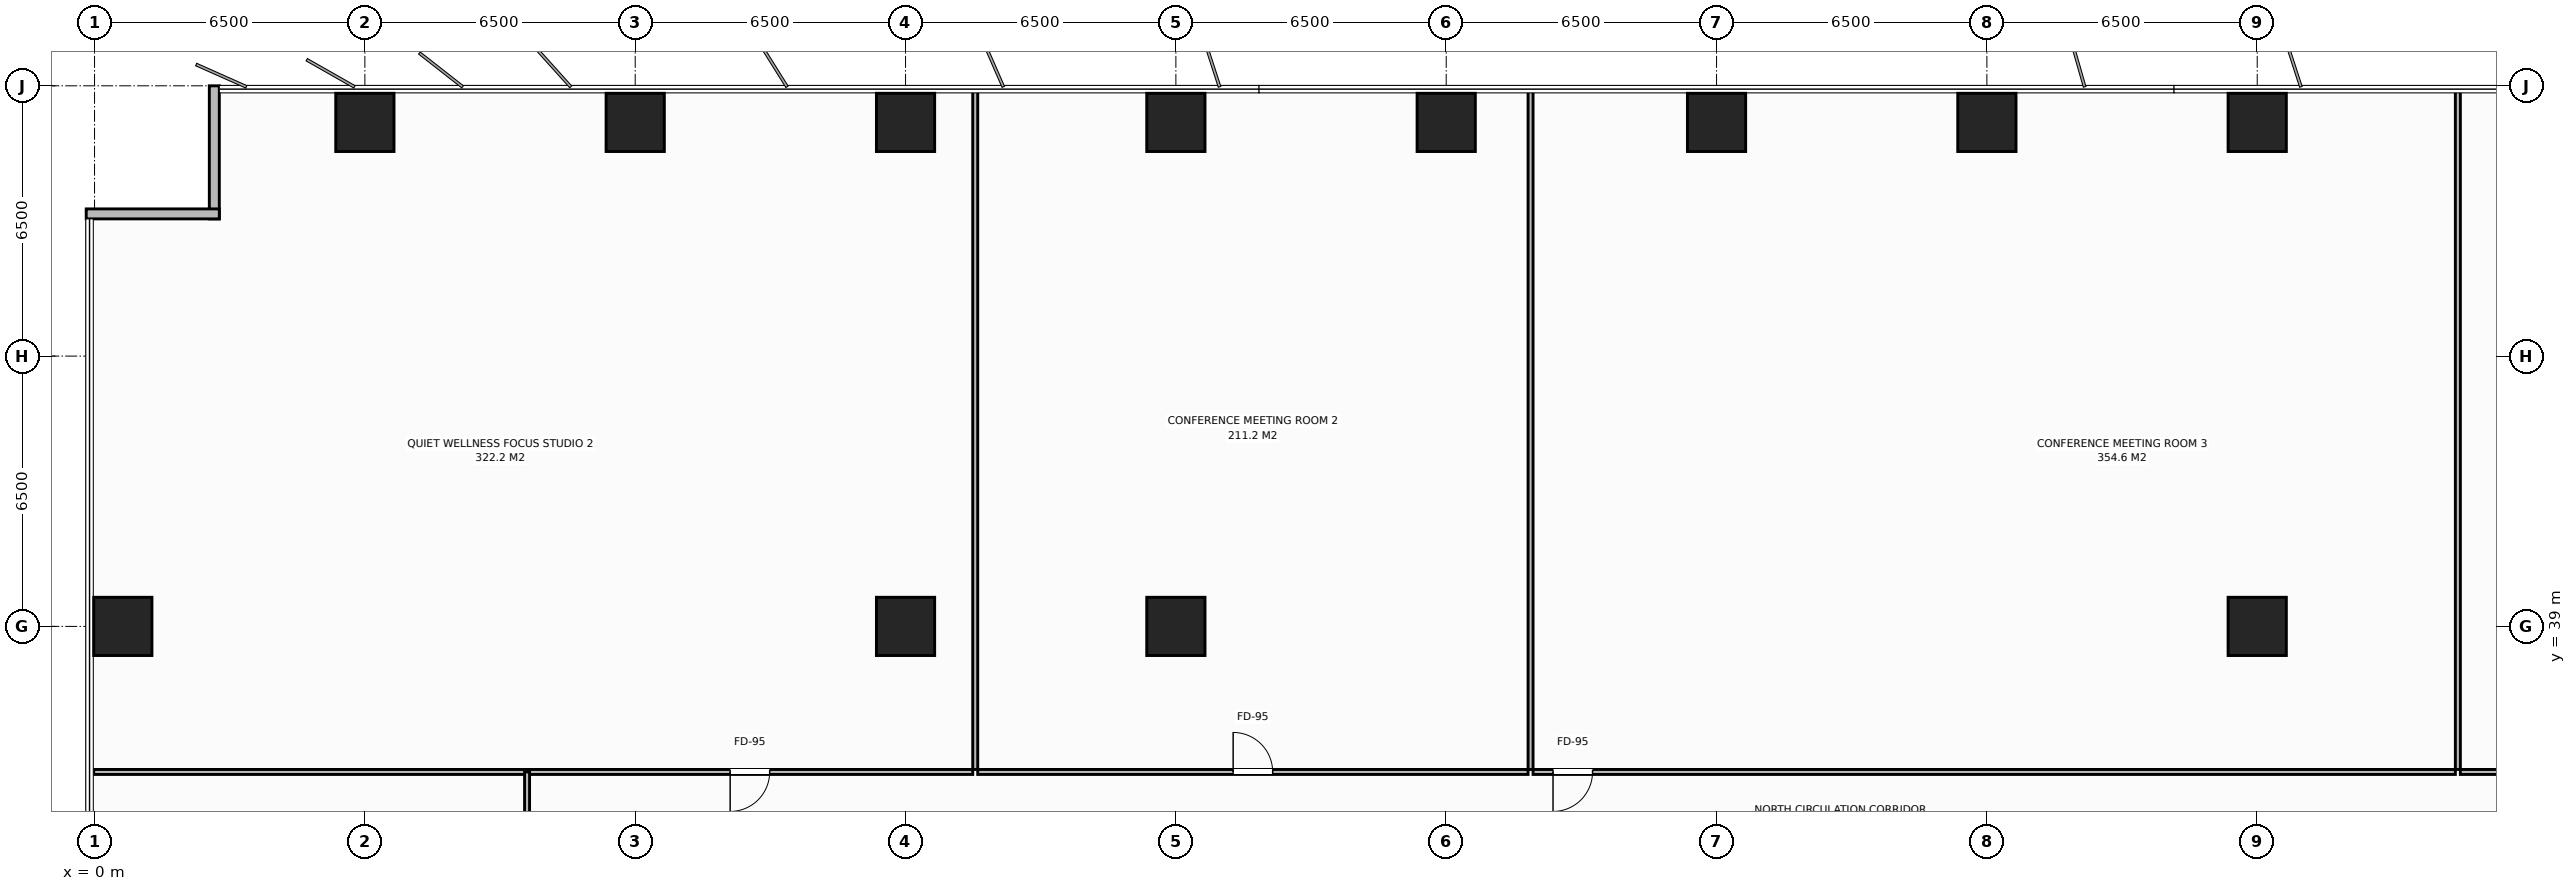
"""IFC4 building model, lengths in metres.
Left out: names, types, materials, properties, quantities, classifications, styles, units other than length and angle.
Written with IfcOpenShell. Run it as: python <this file> out.ifc"""

import sys

from ifc_helpers import new_model, si_unit, direction, frame, frame_2d, origin, origin_2d, place, context, subcontext, project, spatial, rectangle, extrude, element, fill, save


model = new_model("IFC4")
c1 = context("Model", 3, precision=1e-05, world=origin(), true_north=direction((0.0, 1.0)))
c2 = subcontext(c1, "Body", "Model", "MODEL_VIEW")
j1 = project(units=[si_unit("LENGTHUNIT", "METRE"), si_unit("PLANEANGLEUNIT", "RADIAN")], contexts=[c1])
p1 = place(None, origin())
s1 = spatial("IfcSite", under=j1, at=p1, CompositionType="ELEMENT")
p2 = place(p1, origin())
s2 = spatial("IfcBuilding", under=s1, at=p2, CompositionType="ELEMENT")
p3 = place(p2, frame((0.0, 0.0, 62.0)))
s3 = spatial("IfcBuildingStorey", under=s2, at=p3, CompositionType="ELEMENT", Elevation=62.0)
for number, where, z_axis, x_axis in (
    (1, (19.5, 39.0, 0.0), (0.0, 0.0, 1.0), (1.0, 0.0, 0.0)),
    (2, (26.0, 39.0, 0.0), (0.0, 0.0, 1.0), (1.0, 0.0, 0.0)),
    (3, (52.0, 39.0, 0.0), (0.0, 0.0, 1.0), (1.0, 0.0, 0.0)),
    (4, (6.5, 51.12, 0.0), (0.0, 0.0, 1.0), (1.0, 0.0, 0.0)),
    (5, (13.0, 51.12, 0.0), (0.0, 0.0, 1.0), (1.0, 0.0, 0.0)),
    (6, (19.5, 51.12, 0.0), (0.0, 0.0, 1.0), (1.0, 0.0, 0.0)),
    (7, (26.0, 51.12, 0.0), (0.0, 0.0, 1.0), (1.0, 0.0, 0.0)),
    (8, (32.5, 51.12, 0.0), (0.0, 0.0, 1.0), (1.0, 0.0, 0.0)),
    (9, (39.0, 51.12, 0.0), (0.0, 0.0, 1.0), (1.0, 0.0, 0.0)),
    (10, (45.5, 51.12, 0.0), (0.0, 0.0, 1.0), (1.0, 0.0, 0.0)),
    (11, (52.0, 51.12, 0.0), (0.0, 0.0, 1.0), (1.0, 0.0, 0.0)),
    (12, (0.68, 39.0, 0.0), (0.0, 0.0, 1.0), (1.0, 0.0, 0.0)),
):
    element("IfcColumn", number, at=place(p3, frame(where, z_axis=z_axis, x_axis=x_axis)), inside=s3, PredefinedType="COLUMN", context=c2, shape_type="SweptSolid", body=[
        extrude(rectangle(XDim=1.4, YDim=1.4, at=origin_2d()), origin(), (0.0, 0.0, 1.0), 3.8),
    ])
for number, where, z_axis, x_axis in (
    (13, (2.88, 48.8, 0.0), (0.0, 0.0, 1.0), (0.0, 1.0, 0.0)),
    (14, (-0.2, 48.92, 0.0), (0.0, 0.0, 1.0), (1.0, 0.0, 0.0)),
):
    element("IfcWall", number, at=place(p3, frame(where, z_axis=z_axis, x_axis=x_axis)), inside=s3, PredefinedType="STANDARD", context=c2, shape_type="SweptSolid", body=[
        extrude(rectangle(XDim=3.2, YDim=0.24, at=frame_2d((1.6, 0.0))), origin(), (0.0, 0.0, 1.0), 3.55),
    ])
p4 = place(p3, frame((21.176, 35.56, 0.0), z_axis=(0.0, 0.0, 1.0), x_axis=(0.0, 1.0, 0.0)))
e15 = element("IfcWall", 15, at=p4, inside=s3, PredefinedType="PARTITIONING", context=c2, shape_type="SweptSolid", body=[
    extrude(rectangle(XDim=16.42, YDim=0.12, at=frame_2d((8.21, 0.0))), origin(), (0.0, 0.0, 1.0), 3.55),
])
p5 = place(p3, frame((-0.02, 35.5, 0.0), z_axis=(0.0, 0.0, 1.0), x_axis=(1.0, 0.0, 0.0)))
e16 = element("IfcWall", 16, at=p5, inside=s3, PredefinedType="PARTITIONING", context=c2, shape_type="SweptSolid", body=[
    extrude(rectangle(XDim=21.136, YDim=0.12, at=frame_2d((10.568, 0.0))), origin(), (0.0, 0.0, 1.0), 3.55),
])
p6 = place(p5, frame((15.303, 0.0, 0.0)))
e17 = element("IfcOpeningElement", 17, at=p6, cuts=e16, PredefinedType="OPENING", context=c2, shape_type="SweptSolid", body=[
    extrude(rectangle(XDim=0.95, YDim=2.15, at=frame_2d((0.475, 1.075))), frame((0.0, 0.07, 0.0), z_axis=(0.0, -1.0, 0.0), x_axis=(1.0, 0.0, 0.0)), (0.0, 0.0, 1.0), 0.14),
])
p7 = place(p3, frame((34.528, 35.56, 0.0), z_axis=(0.0, 0.0, 1.0), x_axis=(0.0, 1.0, 0.0)))
e18 = element("IfcWall", 18, at=p7, inside=s3, PredefinedType="PARTITIONING", context=c2, shape_type="SweptSolid", body=[
    extrude(rectangle(XDim=16.42, YDim=0.12, at=frame_2d((8.21, 0.0))), origin(), (0.0, 0.0, 1.0), 3.55),
])
p8 = place(p3, frame((21.236, 35.5, 0.0), z_axis=(0.0, 0.0, 1.0), x_axis=(1.0, 0.0, 0.0)))
e19 = element("IfcWall", 19, at=p8, inside=s3, PredefinedType="PARTITIONING", context=c2, shape_type="SweptSolid", body=[
    extrude(rectangle(XDim=13.233, YDim=0.12, at=frame_2d((6.616, 0.0))), origin(), (0.0, 0.0, 1.0), 3.55),
])
p9 = place(p8, frame((6.141, 0.0, 0.0)))
e20 = element("IfcOpeningElement", 20, at=p9, cuts=e19, PredefinedType="OPENING", context=c2, shape_type="SweptSolid", body=[
    extrude(rectangle(XDim=0.95, YDim=2.15, at=frame_2d((0.475, 1.075))), frame((0.0, 0.07, 0.0), z_axis=(0.0, -1.0, 0.0), x_axis=(1.0, 0.0, 0.0)), (0.0, 0.0, 1.0), 0.14),
])
p10 = place(p3, frame((56.824, 35.56, 0.0), z_axis=(0.0, 0.0, 1.0), x_axis=(0.0, 1.0, 0.0)))
e21 = element("IfcWall", 21, at=p10, inside=s3, PredefinedType="PARTITIONING", context=c2, shape_type="SweptSolid", body=[
    extrude(rectangle(XDim=16.42, YDim=0.12, at=frame_2d((8.21, 0.0))), origin(), (0.0, 0.0, 1.0), 3.55),
])
p11 = place(p3, frame((34.588, 35.5, 0.0), z_axis=(0.0, 0.0, 1.0), x_axis=(1.0, 0.0, 0.0)))
e22 = element("IfcWall", 22, at=p11, inside=s3, PredefinedType="PARTITIONING", context=c2, shape_type="SweptSolid", body=[
    extrude(rectangle(XDim=22.176, YDim=0.12, at=frame_2d((11.088, 0.0))), origin(), (0.0, 0.0, 1.0), 3.55),
])
p12 = place(p11, frame((0.48, 0.0, 0.0)))
e23 = element("IfcOpeningElement", 23, at=p12, cuts=e22, PredefinedType="OPENING", context=c2, shape_type="SweptSolid", body=[
    extrude(rectangle(XDim=0.95, YDim=2.15, at=frame_2d((0.475, 1.075))), frame((0.0, 0.07, 0.0), z_axis=(0.0, -1.0, 0.0), x_axis=(1.0, 0.0, 0.0)), (0.0, 0.0, 1.0), 0.14),
])
p13 = place(p3, frame((56.884, 35.5, 0.0), z_axis=(0.0, 0.0, 1.0), x_axis=(1.0, 0.0, 0.0)))
e24 = element("IfcWall", 24, at=p13, inside=s3, PredefinedType="PARTITIONING", context=c2, shape_type="SweptSolid", body=[
    extrude(rectangle(XDim=21.136, YDim=0.12, at=frame_2d((10.568, 0.0))), origin(), (0.0, 0.0, 1.0), 3.55),
])
p14 = place(p13, frame((4.883, 0.0, 0.0)))
e25 = element("IfcOpeningElement", 25, at=p14, cuts=e24, PredefinedType="OPENING", context=c2, shape_type="SweptSolid", body=[
    extrude(rectangle(XDim=0.95, YDim=2.15, at=frame_2d((0.475, 1.075))), frame((0.0, 0.07, 0.0), z_axis=(0.0, -1.0, 0.0), x_axis=(1.0, 0.0, 0.0)), (0.0, 0.0, 1.0), 0.14),
])
p15 = place(p3, frame((10.4, 18.6, 0.0), z_axis=(0.0, 0.0, 1.0), x_axis=(0.0, 1.0, 0.0)))
e26 = element("IfcWall", 26, at=p15, inside=s3, PredefinedType="PARTITIONING", context=c2, shape_type="SweptSolid", body=[
    extrude(rectangle(XDim=16.9, YDim=0.12, at=frame_2d((8.45, 0.0))), origin(), (0.0, 0.0, 1.0), 3.55),
])
p16 = place(p15, frame((6.925, 0.0, 0.0)))
e27 = element("IfcOpeningElement", 27, at=p16, cuts=e26, PredefinedType="OPENING", context=c2, shape_type="SweptSolid", body=[
    extrude(rectangle(XDim=0.95, YDim=2.15, at=frame_2d((0.475, 1.075))), frame((0.0, 0.07, 0.0), z_axis=(0.0, -1.0, 0.0), x_axis=(1.0, 0.0, 0.0)), (0.0, 0.0, 1.0), 0.14),
])
p17 = place(p6, origin())
e28 = element("IfcDoor", 28, at=p17, inside=s3, OperationType="SINGLE_SWING_RIGHT", PredefinedType="DOOR", context=c2, shape_type="SweptSolid", body=[
    extrude(rectangle(XDim=0.95, YDim=2.15, at=frame_2d((0.475, 1.075))), frame((0.0, 0.025, 0.0), z_axis=(0.0, -1.0, 0.0), x_axis=(1.0, 0.0, 0.0)), (0.0, 0.0, 1.0), 0.05),
])
fill(e17, e28)
p18 = place(p9, origin())
e29 = element("IfcDoor", 29, at=p18, inside=s3, OperationType="SINGLE_SWING_LEFT", PredefinedType="DOOR", context=c2, shape_type="SweptSolid", body=[
    extrude(rectangle(XDim=0.95, YDim=2.15, at=frame_2d((0.475, 1.075))), frame((0.0, 0.025, 0.0), z_axis=(0.0, -1.0, 0.0), x_axis=(1.0, 0.0, 0.0)), (0.0, 0.0, 1.0), 0.05),
])
fill(e20, e29)
p19 = place(p12, origin())
e30 = element("IfcDoor", 30, at=p19, inside=s3, OperationType="SINGLE_SWING_RIGHT", PredefinedType="DOOR", context=c2, shape_type="SweptSolid", body=[
    extrude(rectangle(XDim=0.95, YDim=2.15, at=frame_2d((0.475, 1.075))), frame((0.0, 0.025, 0.0), z_axis=(0.0, -1.0, 0.0), x_axis=(1.0, 0.0, 0.0)), (0.0, 0.0, 1.0), 0.05),
])
fill(e23, e30)
save(model, sys.argv[1])
